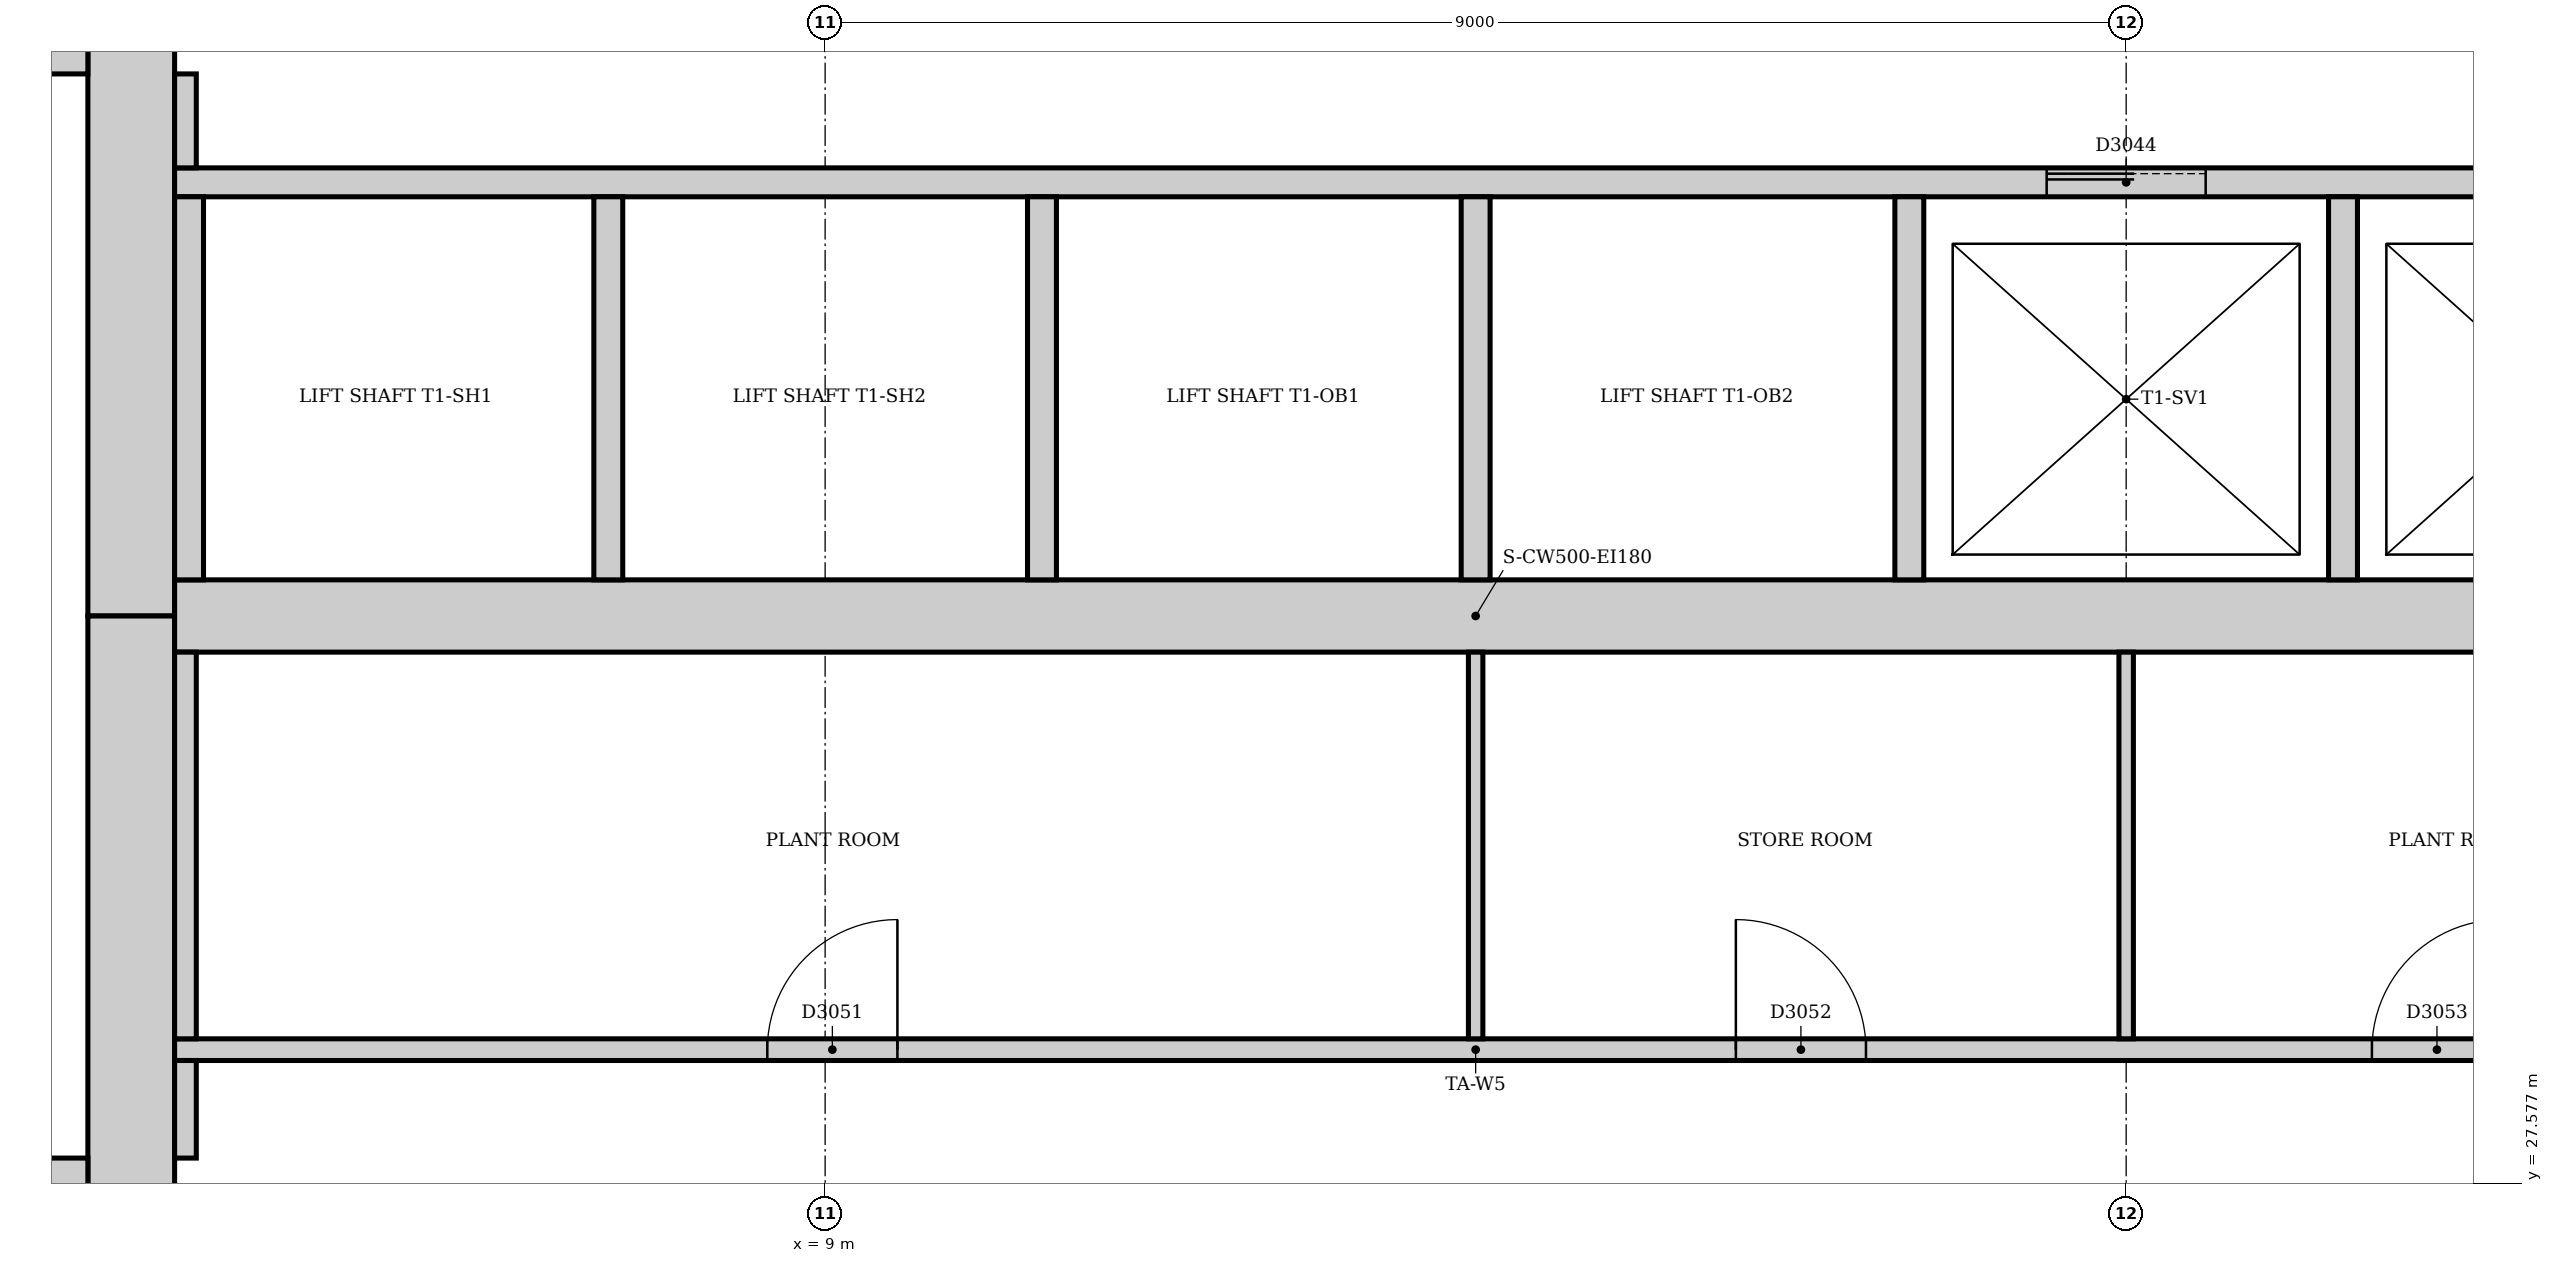
"""IFC4 building model, lengths in metres.
Left out: names, types, materials, properties, quantities, classifications, styles, units other than length and angle.
Written with IfcOpenShell. Run it as: python <this file> out.ifc"""

import sys

from ifc_helpers import new_model, si_unit, direction, frame, frame_2d, origin, place, context, subcontext, project, spatial, rectangle, extrude, element, fill, save


model = new_model("IFC4")
c1 = context("Model", 3, precision=1e-05, world=origin(), true_north=direction((0.0, 1.0)))
c2 = subcontext(c1, "Body", "Model", "MODEL_VIEW")
j1 = project(units=[si_unit("LENGTHUNIT", "METRE"), si_unit("PLANEANGLEUNIT", "RADIAN")], contexts=[c1])
p1 = place(None, origin())
s1 = spatial("IfcSite", under=j1, at=p1, CompositionType="ELEMENT")
p2 = place(p1, origin())
s2 = spatial("IfcBuilding", under=s1, at=p2, CompositionType="ELEMENT")
p3 = place(p2, frame((0.0, 0.0, -5.0)))
s3 = spatial("IfcBuildingStorey", under=s2, at=p3, CompositionType="ELEMENT", Elevation=-5.0)
p4 = place(p3, frame((4.2, 42.0, 0.0), z_axis=(0.0, 0.0, 1.0), x_axis=(0.0, -1.0, 0.0)))
e1 = element("IfcWall", 1, at=p4, inside=s3, PredefinedType="SOLIDWALL", context=c2, shape_type="SweptSolid", body=[
    extrude(rectangle(XDim=10.5, YDim=0.6, at=frame_2d((5.25, 0.0))), origin(), (0.0, 0.0, 1.0), 5.0),
])
p5 = place(p4, frame((5.3, 0.0, 0.0)))
e2 = element("IfcOpeningElement", 2, at=p5, cuts=e1, PredefinedType="OPENING", context=c2, shape_type="SweptSolid", body=[
    extrude(rectangle(XDim=1.0, YDim=2.1, at=frame_2d((0.5, 1.05))), frame((0.0, 0.31, 0.0), z_axis=(0.0, -1.0, 0.0), x_axis=(1.0, 0.0, 0.0)), (0.0, 0.0, 1.0), 0.62),
])
p6 = place(p3, frame((4.2, 31.5, 0.0), z_axis=(0.0, 0.0, 1.0), x_axis=(0.0, -1.0, 0.0)))
e3 = element("IfcWall", 3, at=p6, inside=s3, PredefinedType="SOLIDWALL", context=c2, shape_type="SweptSolid", body=[
    extrude(rectangle(XDim=10.5, YDim=0.6, at=frame_2d((5.25, 0.0))), origin(), (0.0, 0.0, 1.0), 5.0),
])
p7 = place(p6, frame((4.25, 0.0, 0.0)))
e4 = element("IfcOpeningElement", 4, at=p7, cuts=e3, PredefinedType="OPENING", context=c2, shape_type="SweptSolid", body=[
    extrude(rectangle(XDim=1.0, YDim=2.1, at=frame_2d((0.5, 1.05))), frame((0.0, 0.31, 0.0), z_axis=(0.0, -1.0, 0.0), x_axis=(1.0, 0.0, 0.0)), (0.0, 0.0, 1.0), 0.62),
])
p8 = place(p3, frame((4.5, 31.5, 0.0), z_axis=(0.0, 0.0, 1.0), x_axis=(1.0, 0.0, 0.0)))
e5 = element("IfcWall", 5, at=p8, inside=s3, PredefinedType="SOLIDWALL", context=c2, shape_type="SweptSolid", body=[
    extrude(rectangle(XDim=18.0, YDim=0.5, at=frame_2d((9.0, 0.0))), origin(), (0.0, 0.0, 1.0), 5.0),
])
p9 = place(p3, frame((3.9, 27.625, 0.0), z_axis=(0.0, 0.0, 1.0), x_axis=(-1.0, 0.0, 0.0)))
e6 = element("IfcWall", 6, at=p9, inside=s3, PredefinedType="SOLIDWALL", context=c2, shape_type="SweptSolid", body=[
    extrude(rectangle(XDim=3.54, YDim=0.25, at=frame_2d((1.77, 0.0))), origin(), (0.0, 0.0, 1.0), 5.0),
])
p10 = place(p9, frame((0.4, 0.0, 0.0)))
e7 = element("IfcOpeningElement", 7, at=p10, cuts=e6, PredefinedType="OPENING", context=c2, shape_type="SweptSolid", body=[
    extrude(rectangle(XDim=1.0, YDim=2.1, at=frame_2d((0.5, 1.05))), frame((0.0, 0.135, 0.0), z_axis=(0.0, -1.0, 0.0), x_axis=(1.0, 0.0, 0.0)), (0.0, 0.0, 1.0), 0.27),
])
p11 = place(p3, frame((0.36, 35.375, 0.0), z_axis=(0.0, 0.0, 1.0), x_axis=(1.0, 0.0, 0.0)))
e8 = element("IfcWall", 8, at=p11, inside=s3, PredefinedType="SOLIDWALL", context=c2, shape_type="SweptSolid", body=[
    extrude(rectangle(XDim=3.54, YDim=0.25, at=frame_2d((1.77, 0.0))), origin(), (0.0, 0.0, 1.0), 5.0),
])
p12 = place(p11, frame((2.14, 0.0, 0.0)))
e9 = element("IfcOpeningElement", 9, at=p12, cuts=e8, PredefinedType="OPENING", context=c2, shape_type="SweptSolid", body=[
    extrude(rectangle(XDim=1.0, YDim=2.1, at=frame_2d((0.5, 1.05))), frame((0.0, 0.135, 0.0), z_axis=(0.0, -1.0, 0.0), x_axis=(1.0, 0.0, 0.0)), (0.0, 0.0, 1.0), 0.27),
])
p13 = place(p3, frame((4.5, 34.5, 0.0), z_axis=(0.0, 0.0, 1.0), x_axis=(1.0, 0.0, 0.0)))
e10 = element("IfcWall", 10, at=p13, inside=s3, PredefinedType="PARTITIONING", context=c2, shape_type="SweptSolid", body=[
    extrude(rectangle(XDim=18.0, YDim=0.2, at=frame_2d((9.0, 0.0))), origin(), (0.0, 0.0, 1.0), 4.7),
])
p14 = place(p13, frame((12.95, 0.0, 0.0)))
e11 = element("IfcOpeningElement", 11, at=p14, cuts=e10, PredefinedType="OPENING", context=c2, shape_type="SweptSolid", body=[
    extrude(rectangle(XDim=1.1, YDim=2.1, at=frame_2d((0.55, 1.05))), frame((0.0, 0.11, 0.0), z_axis=(0.0, -1.0, 0.0), x_axis=(1.0, 0.0, 0.0)), (0.0, 0.0, 1.0), 0.22),
])
p15 = place(p13, frame((15.95, 0.0, 0.0)))
e12 = element("IfcOpeningElement", 12, at=p15, cuts=e10, PredefinedType="OPENING", context=c2, shape_type="SweptSolid", body=[
    extrude(rectangle(XDim=1.1, YDim=2.1, at=frame_2d((0.55, 1.05))), frame((0.0, 0.11, 0.0), z_axis=(0.0, -1.0, 0.0), x_axis=(1.0, 0.0, 0.0)), (0.0, 0.0, 1.0), 0.22),
])
for number, where, z_axis, x_axis in (
    (13, (4.6, 31.75, 0.0), (0.0, 0.0, 1.0), (0.0, 1.0, 0.0)),
    (14, (7.5, 31.75, 0.0), (0.0, 0.0, 1.0), (0.0, 1.0, 0.0)),
    (15, (10.5, 31.75, 0.0), (0.0, 0.0, 1.0), (0.0, 1.0, 0.0)),
    (16, (13.5, 31.75, 0.0), (0.0, 0.0, 1.0), (0.0, 1.0, 0.0)),
    (17, (16.5, 31.75, 0.0), (0.0, 0.0, 1.0), (0.0, 1.0, 0.0)),
    (18, (19.5, 31.75, 0.0), (0.0, 0.0, 1.0), (0.0, 1.0, 0.0)),
):
    element("IfcWall", number, at=place(p3, frame(where, z_axis=z_axis, x_axis=x_axis)), inside=s3, PredefinedType="PARTITIONING", context=c2, shape_type="SweptSolid", body=[
        extrude(rectangle(XDim=2.65, YDim=0.2, at=frame_2d((1.325, 0.0))), origin(), (0.0, 0.0, 1.0), 4.7),
    ])
p16 = place(p3, frame((4.5, 28.5, 0.0), z_axis=(0.0, 0.0, 1.0), x_axis=(1.0, 0.0, 0.0)))
e19 = element("IfcWall", 19, at=p16, inside=s3, PredefinedType="PARTITIONING", context=c2, shape_type="SweptSolid", body=[
    extrude(rectangle(XDim=18.0, YDim=0.15, at=frame_2d((9.0, 0.0))), origin(), (0.0, 0.0, 1.0), 4.7),
])
p17 = place(p16, frame((4.1, 0.0, 0.0)))
e20 = element("IfcOpeningElement", 20, at=p17, cuts=e19, PredefinedType="OPENING", context=c2, shape_type="SweptSolid", body=[
    extrude(rectangle(XDim=0.9, YDim=2.1, at=frame_2d((0.45, 1.05))), frame((0.0, 0.085, 0.0), z_axis=(0.0, -1.0, 0.0), x_axis=(1.0, 0.0, 0.0)), (0.0, 0.0, 1.0), 0.17),
])
p18 = place(p16, frame((10.8, 0.0, 0.0)))
e21 = element("IfcOpeningElement", 21, at=p18, cuts=e19, PredefinedType="OPENING", context=c2, shape_type="SweptSolid", body=[
    extrude(rectangle(XDim=0.9, YDim=2.1, at=frame_2d((0.45, 1.05))), frame((0.0, 0.085, 0.0), z_axis=(0.0, -1.0, 0.0), x_axis=(1.0, 0.0, 0.0)), (0.0, 0.0, 1.0), 0.17),
])
p19 = place(p16, frame((15.2, 0.0, 0.0)))
e22 = element("IfcOpeningElement", 22, at=p19, cuts=e19, PredefinedType="OPENING", context=c2, shape_type="SweptSolid", body=[
    extrude(rectangle(XDim=0.9, YDim=2.1, at=frame_2d((0.45, 1.05))), frame((0.0, 0.085, 0.0), z_axis=(0.0, -1.0, 0.0), x_axis=(1.0, 0.0, 0.0)), (0.0, 0.0, 1.0), 0.17),
])
p20 = place(p3, frame((4.575, 27.75, 0.0), z_axis=(0.0, 0.0, 1.0), x_axis=(0.0, 1.0, 0.0)))
e23 = element("IfcWall", 23, at=p20, inside=s3, PredefinedType="PARTITIONING", context=c2, shape_type="SweptSolid", body=[
    extrude(rectangle(XDim=0.675, YDim=0.15, at=frame_2d((0.338, 0.0))), origin(), (0.0, 0.0, 1.0), 4.7),
])
p21 = place(p3, frame((4.575, 28.575, 0.0), z_axis=(0.0, 0.0, 1.0), x_axis=(0.0, 1.0, 0.0)))
e24 = element("IfcWall", 24, at=p21, inside=s3, PredefinedType="PARTITIONING", context=c2, shape_type="SweptSolid", body=[
    extrude(rectangle(XDim=2.675, YDim=0.15, at=frame_2d((1.337, 0.0))), origin(), (0.0, 0.0, 1.0), 4.7),
])
p22 = place(p3, frame((4.575, 34.6, 0.0), z_axis=(0.0, 0.0, 1.0), x_axis=(0.0, 1.0, 0.0)))
e25 = element("IfcWall", 25, at=p22, inside=s3, PredefinedType="PARTITIONING", context=c2, shape_type="SweptSolid", body=[
    extrude(rectangle(XDim=0.65, YDim=0.15, at=frame_2d((0.325, 0.0))), origin(), (0.0, 0.0, 1.0), 4.7),
])
for number, where, z_axis, x_axis in (
    (26, (13.5, 28.575, 0.0), (0.0, 0.0, 1.0), (0.0, 1.0, 0.0)),
    (27, (18.0, 28.575, 0.0), (0.0, 0.0, 1.0), (0.0, 1.0, 0.0)),
):
    element("IfcWall", number, at=place(p3, frame(where, z_axis=z_axis, x_axis=x_axis)), inside=s3, PredefinedType="PARTITIONING", context=c2, shape_type="SweptSolid", body=[
        extrude(rectangle(XDim=2.675, YDim=0.1, at=frame_2d((1.337, 0.0))), origin(), (0.0, 0.0, 1.0), 4.7),
    ])
p23 = place(p14, origin())
e28 = element("IfcDoor", 28, at=p23, inside=s3, OperationType="SLIDING_TO_LEFT", PredefinedType="DOOR", context=c2, shape_type="SweptSolid", body=[
    extrude(rectangle(XDim=1.1, YDim=2.1, at=frame_2d((0.55, 1.05))), frame((0.0, 0.025, 0.0), z_axis=(0.0, -1.0, 0.0), x_axis=(1.0, 0.0, 0.0)), (0.0, 0.0, 1.0), 0.05),
])
fill(e11, e28)
p24 = place(p17, origin())
e29 = element("IfcDoor", 29, at=p24, inside=s3, OperationType="SINGLE_SWING_RIGHT", PredefinedType="DOOR", context=c2, shape_type="SweptSolid", body=[
    extrude(rectangle(XDim=0.9, YDim=2.1, at=frame_2d((0.45, 1.05))), frame((0.0, 0.025, 0.0), z_axis=(0.0, -1.0, 0.0), x_axis=(1.0, 0.0, 0.0)), (0.0, 0.0, 1.0), 0.05),
])
fill(e20, e29)
p25 = place(p18, origin())
e30 = element("IfcDoor", 30, at=p25, inside=s3, OperationType="SINGLE_SWING_LEFT", PredefinedType="DOOR", context=c2, shape_type="SweptSolid", body=[
    extrude(rectangle(XDim=0.9, YDim=2.1, at=frame_2d((0.45, 1.05))), frame((0.0, 0.025, 0.0), z_axis=(0.0, -1.0, 0.0), x_axis=(1.0, 0.0, 0.0)), (0.0, 0.0, 1.0), 0.05),
])
fill(e21, e30)
p26 = place(p19, origin())
e31 = element("IfcDoor", 31, at=p26, inside=s3, OperationType="SINGLE_SWING_RIGHT", PredefinedType="DOOR", context=c2, shape_type="SweptSolid", body=[
    extrude(rectangle(XDim=0.9, YDim=2.1, at=frame_2d((0.45, 1.05))), frame((0.0, 0.025, 0.0), z_axis=(0.0, -1.0, 0.0), x_axis=(1.0, 0.0, 0.0)), (0.0, 0.0, 1.0), 0.05),
])
fill(e22, e31)
save(model, sys.argv[1])
